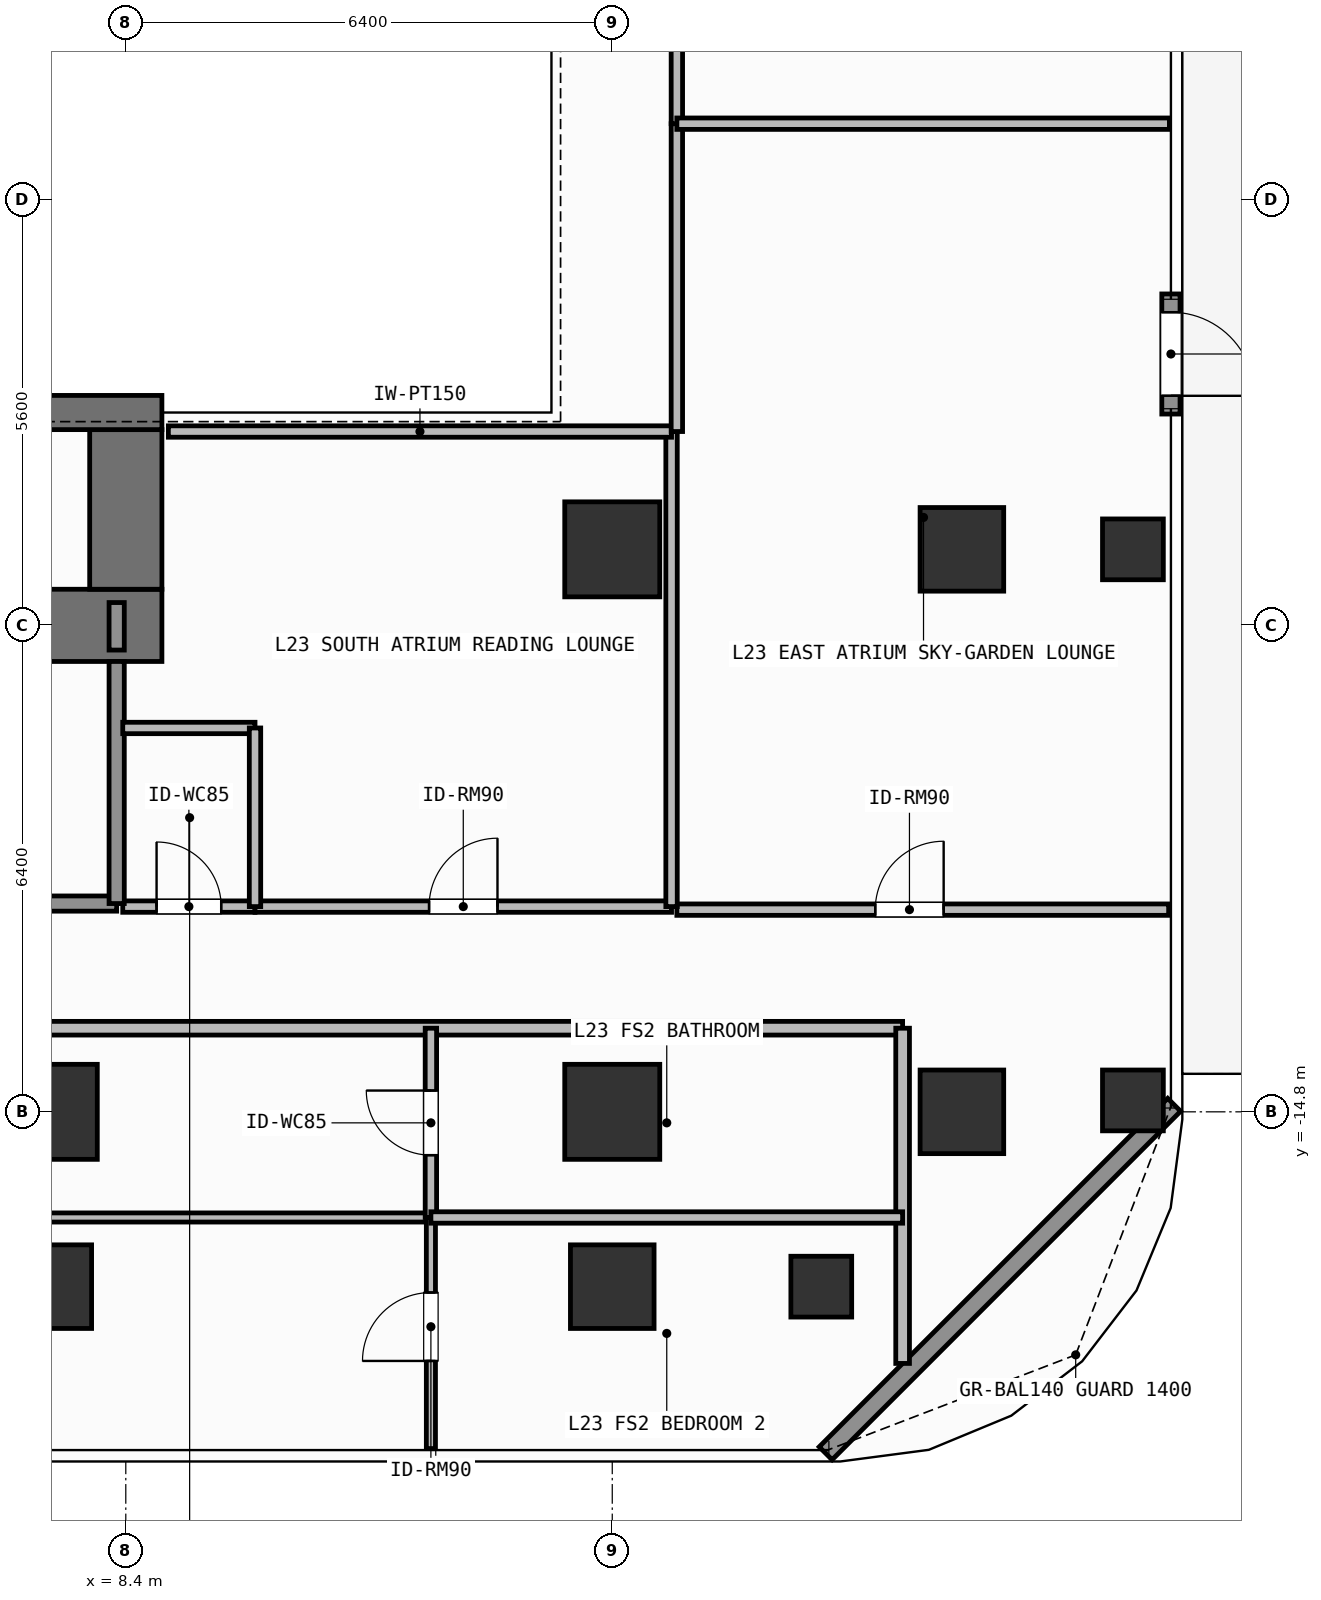
"""IFC4 building model, lengths in metres.
Left out: names, types, materials, properties, quantities, classifications, styles, units other than length and angle.
Written with IfcOpenShell. Run it as: python <this file> out.ifc"""

import sys

from ifc_helpers import new_model, si_unit, direction, frame, frame_2d, origin, origin_2d, place, context, subcontext, project, spatial, rectangle, hollow_rectangle, extrude, element, fill, save


model = new_model("IFC4")
c1 = context("Model", 3, precision=1e-05, world=origin(), true_north=direction((0.0, 1.0)))
c2 = subcontext(c1, "Body", "Model", "MODEL_VIEW")
j1 = project(units=[si_unit("LENGTHUNIT", "METRE"), si_unit("PLANEANGLEUNIT", "RADIAN")], contexts=[c1])
p1 = place(None, origin())
s1 = spatial("IfcSite", under=j1, at=p1, CompositionType="ELEMENT")
p2 = place(p1, origin())
s2 = spatial("IfcBuilding", under=s1, at=p2, CompositionType="ELEMENT")
p3 = place(p2, frame((0.0, 0.0, 93.0)))
s3 = spatial("IfcBuildingStorey", under=s2, at=p3, CompositionType="ELEMENT", Elevation=93.0)
p4 = place(p3, frame((6.12, -8.4, 0.0), z_axis=(0.0, 0.0, 1.0), x_axis=(1.0, 0.0, 0.0)))
e1 = element("IfcWall", 1, at=p4, inside=s3, PredefinedType="SHEAR", context=c2, shape_type="SweptSolid", body=[
    extrude(rectangle(XDim=2.755, YDim=0.95, at=frame_2d((1.377, 0.0))), origin(), (0.0, 0.0, 1.0), 3.9),
])
p5 = place(p3, frame((8.4, -7.925, 0.0), z_axis=(0.0, 0.0, 1.0), x_axis=(0.0, 1.0, 0.0)))
e2 = element("IfcWall", 2, at=p5, inside=s3, PredefinedType="SHEAR", context=c2, shape_type="SweptSolid", body=[
    extrude(rectangle(XDim=2.1, YDim=0.95, at=frame_2d((1.05, 0.0))), origin(), (0.0, 0.0, 1.0), 3.9),
])
p6 = place(p3, frame((3.045, -5.6, 0.0), z_axis=(0.0, 0.0, 1.0), x_axis=(1.0, 0.0, 0.0)))
e3 = element("IfcWall", 3, at=p6, inside=s3, PredefinedType="SHEAR", context=c2, shape_type="SweptSolid", body=[
    extrude(rectangle(XDim=5.83, YDim=0.45, at=frame_2d((2.915, 0.0))), origin(), (0.0, 0.0, 1.0), 3.9),
])
for number, where, z_axis, x_axis in (
    (4, (7.4, -14.8, 0.0), (0.0, 0.0, 1.0), (1.0, 0.0, 0.0)),
    (5, (14.8, -14.8, 0.0), (0.0, 0.0, 1.0), (1.0, 0.0, 0.0)),
    (6, (14.8, -7.4, 0.0), (0.0, 0.0, 1.0), (1.0, 0.0, 0.0)),
):
    element("IfcColumn", number, at=place(p3, frame(where, z_axis=z_axis, x_axis=x_axis)), inside=s3, PredefinedType="COLUMN", context=c2, shape_type="SweptSolid", body=[
        extrude(rectangle(XDim=1.25, YDim=1.25, at=origin_2d()), origin(), (0.0, 0.0, 1.0), 3.9),
    ])
for number, where, z_axis, x_axis in (
    (7, (19.4, -14.8, 0.0), (0.0, 0.0, 1.0), (1.0, 0.0, 0.0)),
    (8, (19.4, -7.4, 0.0), (0.0, 0.0, 1.0), (1.0, 0.0, 0.0)),
    (9, (7.4, -17.1, 0.0), (0.0, 0.0, 1.0), (1.0, 0.0, 0.0)),
    (10, (14.8, -17.1, 0.0), (0.0, 0.0, 1.0), (1.0, 0.0, 0.0)),
):
    element("IfcColumn", number, at=place(p3, frame(where, z_axis=z_axis, x_axis=x_axis)), inside=s3, PredefinedType="COLUMN", context=c2, shape_type="SweptSolid", body=[
        extrude(rectangle(XDim=1.1, YDim=1.1, at=origin_2d()), origin(), (0.0, 0.0, 1.0), 3.9),
    ])
for number, where, z_axis, x_axis in (
    (11, (17.55, -17.1, 0.0), (0.0, 0.0, 1.0), (1.0, 0.0, 0.0)),
    (12, (21.65, -14.65, 0.0), (0.0, 0.0, 1.0), (1.0, 0.0, 0.0)),
    (13, (21.65, -7.4, 0.0), (0.0, 0.0, 1.0), (1.0, 0.0, 0.0)),
):
    element("IfcColumn", number, at=place(p3, frame(where, z_axis=z_axis, x_axis=x_axis)), inside=s3, PredefinedType="COLUMN", context=c2, shape_type="SweptSolid", body=[
        extrude(hollow_rectangle(XDim=0.8, YDim=0.8, WallThickness=0.036, at=origin_2d()), origin(), (0.0, 0.0, 1.0), 3.9),
    ])
p7 = place(p3, frame((22.15, -4.04, 0.0), z_axis=(0.0, 0.0, 1.0), x_axis=(0.0, -1.0, 0.0)))
e14 = element("IfcWall", 14, at=p7, inside=s3, PredefinedType="SOLIDWALL", context=c2, shape_type="SweptSolid", body=[
    extrude(rectangle(XDim=1.58, YDim=0.24, at=frame_2d((0.79, 0.0))), origin(), (0.0, 0.0, 1.0), 3.68),
])
p8 = place(p7, frame((0.24, 0.0, 0.0)))
e15 = element("IfcOpeningElement", 15, at=p8, cuts=e14, PredefinedType="OPENING", context=c2, shape_type="SweptSolid", body=[
    extrude(rectangle(XDim=1.1, YDim=2.2, at=frame_2d((0.55, 1.1))), frame((0.0, 0.13, 0.0), z_axis=(0.0, -1.0, 0.0), x_axis=(1.0, 0.0, 0.0)), (0.0, 0.0, 1.0), 0.26),
])
p9 = place(p3, frame((22.192, -14.708, 0.0), z_axis=(0.0, 0.0, 1.0), x_axis=(-0.707087954376, -0.707125607496, 0.0)))
e16 = element("IfcWall", 16, at=p9, inside=s3, PredefinedType="SOLIDWALL", context=c2, shape_type="SweptSolid", body=[
    extrude(rectangle(XDim=6.484, YDim=0.24, at=frame_2d((3.242, 0.0))), origin(), (0.0, 0.0, 1.0), 3.68),
])
p10 = place(p3, frame((4.58, -12.06, 0.0), z_axis=(0.0, 0.0, 1.0), x_axis=(1.0, 0.0, 0.0)))
e17 = element("IfcWall", 17, at=p10, inside=s3, PredefinedType="SOLIDWALL", context=c2, shape_type="SweptSolid", body=[
    extrude(rectangle(XDim=3.7, YDim=0.2, at=frame_2d((1.85, 0.0))), origin(), (0.0, 0.0, 1.0), 3.68),
])
p11 = place(p10, frame((1.212, 0.0, 0.0)))
e18 = element("IfcOpeningElement", 18, at=p11, cuts=e17, PredefinedType="OPENING", context=c2, shape_type="SweptSolid", body=[
    extrude(rectangle(XDim=1.1, YDim=2.15, at=frame_2d((0.55, 1.075))), frame((0.0, 0.11, 0.0), z_axis=(0.0, -1.0, 0.0), x_axis=(1.0, 0.0, 0.0)), (0.0, 0.0, 1.0), 0.22),
])
p12 = place(p3, frame((8.36, -12.1, 0.0), z_axis=(0.0, 0.0, 1.0), x_axis=(1.0, 0.0, 0.0)))
e19 = element("IfcWall", 19, at=p12, inside=s3, PredefinedType="PARTITIONING", context=c2, shape_type="SweptSolid", body=[
    extrude(rectangle(XDim=1.74, YDim=0.15, at=frame_2d((0.87, 0.0))), origin(), (0.0, 0.0, 1.0), 3.68),
])
p13 = place(p12, frame((0.445, 0.0, 0.0)))
e20 = element("IfcOpeningElement", 20, at=p13, cuts=e19, PredefinedType="OPENING", context=c2, shape_type="SweptSolid", body=[
    extrude(rectangle(XDim=0.85, YDim=2.1, at=frame_2d((0.425, 1.05))), frame((0.0, 0.085, 0.0), z_axis=(0.0, -1.0, 0.0), x_axis=(1.0, 0.0, 0.0)), (0.0, 0.0, 1.0), 0.17),
])
p14 = place(p3, frame((10.1, -12.1, 0.0), z_axis=(0.0, 0.0, 1.0), x_axis=(1.0, 0.0, 0.0)))
e21 = element("IfcWall", 21, at=p14, inside=s3, PredefinedType="PARTITIONING", context=c2, shape_type="SweptSolid", body=[
    extrude(rectangle(XDim=5.48, YDim=0.15, at=frame_2d((2.74, 0.0))), origin(), (0.0, 0.0, 1.0), 3.68),
])
p15 = place(p14, frame((2.29, 0.0, 0.0)))
e22 = element("IfcOpeningElement", 22, at=p15, cuts=e21, PredefinedType="OPENING", context=c2, shape_type="SweptSolid", body=[
    extrude(rectangle(XDim=0.9, YDim=2.1, at=frame_2d((0.45, 1.05))), frame((0.0, 0.085, 0.0), z_axis=(0.0, -1.0, 0.0), x_axis=(1.0, 0.0, 0.0)), (0.0, 0.0, 1.0), 0.17),
])
p16 = place(p3, frame((-7.634, -13.7, 0.0), z_axis=(0.0, 0.0, 1.0), x_axis=(1.0, 0.0, 0.0)))
e23 = element("IfcWall", 23, at=p16, inside=s3, PredefinedType="PARTITIONING", context=c2, shape_type="SweptSolid", body=[
    extrude(rectangle(XDim=26.254, YDim=0.18, at=frame_2d((13.127, 0.0))), origin(), (0.0, 0.0, 1.0), 3.68),
])
p17 = place(p16, frame((12.178, 0.0, 0.0)))
e24 = element("IfcOpeningElement", 24, at=p17, cuts=e23, PredefinedType="OPENING", context=c2, shape_type="SweptSolid", body=[
    extrude(rectangle(XDim=1.0, YDim=2.2, at=frame_2d((0.5, 1.1))), frame((0.0, 0.1, 0.0), z_axis=(0.0, -1.0, 0.0), x_axis=(1.0, 0.0, 0.0)), (0.0, 0.0, 1.0), 0.2),
])
p18 = place(p3, frame((-2.24, -16.19, 0.0), z_axis=(0.0, 0.0, 1.0), x_axis=(1.0, 0.0, 0.0)))
e25 = element("IfcWall", 25, at=p18, inside=s3, PredefinedType="PARTITIONING", context=c2, shape_type="SweptSolid", body=[
    extrude(rectangle(XDim=14.654, YDim=0.12, at=frame_2d((7.327, 0.0))), origin(), (0.0, 0.0, 1.0), 3.68),
])
p19 = place(p18, frame((6.787, 0.0, 0.0)))
e26 = element("IfcOpeningElement", 26, at=p19, cuts=e25, PredefinedType="OPENING", context=c2, shape_type="SweptSolid", body=[
    extrude(rectangle(XDim=0.9, YDim=2.1, at=frame_2d((0.45, 1.05))), frame((0.0, 0.07, 0.0), z_axis=(0.0, -1.0, 0.0), x_axis=(1.0, 0.0, 0.0)), (0.0, 0.0, 1.0), 0.14),
])
p20 = place(p3, frame((12.414, -16.19, 0.0), z_axis=(0.0, 0.0, 1.0), x_axis=(0.0, 1.0, 0.0)))
e27 = element("IfcWall", 27, at=p20, inside=s3, PredefinedType="PARTITIONING", context=c2, shape_type="SweptSolid", body=[
    extrude(rectangle(XDim=2.49, YDim=0.15, at=frame_2d((1.245, 0.0))), origin(), (0.0, 0.0, 1.0), 3.68),
])
p21 = place(p20, frame((0.82, 0.0, 0.0)))
e28 = element("IfcOpeningElement", 28, at=p21, cuts=e27, PredefinedType="OPENING", context=c2, shape_type="SweptSolid", body=[
    extrude(rectangle(XDim=0.85, YDim=2.1, at=frame_2d((0.425, 1.05))), frame((0.0, 0.085, 0.0), z_axis=(0.0, -1.0, 0.0), x_axis=(1.0, 0.0, 0.0)), (0.0, 0.0, 1.0), 0.17),
])
p22 = place(p3, frame((12.414, -19.23, 0.0), z_axis=(0.0, 0.0, 1.0), x_axis=(0.0, 1.0, 0.0)))
e29 = element("IfcWall", 29, at=p22, inside=s3, PredefinedType="PARTITIONING", context=c2, shape_type="SweptSolid", body=[
    extrude(rectangle(XDim=3.04, YDim=0.12, at=frame_2d((1.52, 0.0))), origin(), (0.0, 0.0, 1.0), 3.68),
])
p23 = place(p22, frame((1.153, 0.0, 0.0)))
e30 = element("IfcOpeningElement", 30, at=p23, cuts=e29, PredefinedType="OPENING", context=c2, shape_type="SweptSolid", body=[
    extrude(rectangle(XDim=0.9, YDim=2.1, at=frame_2d((0.45, 1.05))), frame((0.0, 0.07, 0.0), z_axis=(0.0, -1.0, 0.0), x_axis=(1.0, 0.0, 0.0)), (0.0, 0.0, 1.0), 0.14),
])
p24 = place(p3, frame((15.65, -12.14, 0.0), z_axis=(0.0, 0.0, 1.0), x_axis=(1.0, 0.0, 0.0)))
e31 = element("IfcWall", 31, at=p24, inside=s3, PredefinedType="PARTITIONING", context=c2, shape_type="SweptSolid", body=[
    extrude(rectangle(XDim=6.47, YDim=0.15, at=frame_2d((3.235, 0.0))), origin(), (0.0, 0.0, 1.0), 3.68),
])
p25 = place(p24, frame((2.61, 0.0, 0.0)))
e32 = element("IfcOpeningElement", 32, at=p25, cuts=e31, PredefinedType="OPENING", context=c2, shape_type="SweptSolid", body=[
    extrude(rectangle(XDim=0.9, YDim=2.1, at=frame_2d((0.45, 1.05))), frame((0.0, 0.085, 0.0), z_axis=(0.0, -1.0, 0.0), x_axis=(1.0, 0.0, 0.0)), (0.0, 0.0, 1.0), 0.17),
])
p26 = place(p3, frame((8.28, -12.06, 0.0), z_axis=(0.0, 0.0, 1.0), x_axis=(0.0, 1.0, 0.0)))
e33 = element("IfcWall", 33, at=p26, inside=s3, PredefinedType="SOLIDWALL", context=c2, shape_type="SweptSolid", body=[
    extrude(rectangle(XDim=3.185, YDim=0.2, at=frame_2d((1.593, 0.0))), origin(), (0.0, 0.0, 1.0), 3.68),
])
p27 = place(p3, frame((8.28, -8.725, 0.0), z_axis=(0.0, 0.0, 1.0), x_axis=(0.0, 1.0, 0.0)))
e34 = element("IfcWall", 34, at=p27, inside=s3, PredefinedType="SOLIDWALL", context=c2, shape_type="SweptSolid", body=[
    extrude(rectangle(XDim=0.625, YDim=0.2, at=frame_2d((0.312, 0.0))), origin(), (0.0, 0.0, 1.0), 3.68),
])
p28 = place(p3, frame((8.36, -9.75, 0.0), z_axis=(0.0, 0.0, 1.0), x_axis=(1.0, 0.0, 0.0)))
e35 = element("IfcWall", 35, at=p28, inside=s3, PredefinedType="PARTITIONING", context=c2, shape_type="SweptSolid", body=[
    extrude(rectangle(XDim=1.74, YDim=0.15, at=frame_2d((0.87, 0.0))), origin(), (0.0, 0.0, 1.0), 3.68),
])
p29 = place(p3, frame((10.1, -12.1, 0.0), z_axis=(0.0, 0.0, 1.0), x_axis=(0.0, 1.0, 0.0)))
e36 = element("IfcWall", 36, at=p29, inside=s3, PredefinedType="PARTITIONING", context=c2, shape_type="SweptSolid", body=[
    extrude(rectangle(XDim=2.35, YDim=0.15, at=frame_2d((1.175, 0.0))), origin(), (0.0, 0.0, 1.0), 3.68),
])
p30 = place(p3, frame((15.58, -12.1, 0.0), z_axis=(0.0, 0.0, 1.0), x_axis=(0.0, 1.0, 0.0)))
e37 = element("IfcWall", 37, at=p30, inside=s3, PredefinedType="PARTITIONING", context=c2, shape_type="SweptSolid", body=[
    extrude(rectangle(XDim=6.25, YDim=0.15, at=frame_2d((3.125, 0.0))), origin(), (0.0, 0.0, 1.0), 3.68),
])
p31 = place(p3, frame((8.96, -5.85, 0.0), z_axis=(0.0, 0.0, 1.0), x_axis=(1.0, 0.0, 0.0)))
e38 = element("IfcWall", 38, at=p31, inside=s3, PredefinedType="PARTITIONING", context=c2, shape_type="SweptSolid", body=[
    extrude(rectangle(XDim=6.62, YDim=0.15, at=frame_2d((3.31, 0.0))), origin(), (0.0, 0.0, 1.0), 3.68),
])
p32 = place(p3, frame((18.62, -18.11, 0.0), z_axis=(0.0, 0.0, 1.0), x_axis=(0.0, 1.0, 0.0)))
e39 = element("IfcWall", 39, at=p32, inside=s3, PredefinedType="PARTITIONING", context=c2, shape_type="SweptSolid", body=[
    extrude(rectangle(XDim=4.41, YDim=0.18, at=frame_2d((2.205, 0.0))), origin(), (0.0, 0.0, 1.0), 3.68),
])
p33 = place(p3, frame((12.414, -16.19, 0.0), z_axis=(0.0, 0.0, 1.0), x_axis=(1.0, 0.0, 0.0)))
e40 = element("IfcWall", 40, at=p33, inside=s3, PredefinedType="PARTITIONING", context=c2, shape_type="SweptSolid", body=[
    extrude(rectangle(XDim=6.206, YDim=0.15, at=frame_2d((3.103, 0.0))), origin(), (0.0, 0.0, 1.0), 3.68),
])
p34 = place(p3, frame((15.65, -5.85, 0.0), z_axis=(0.0, 0.0, 1.0), x_axis=(0.0, 1.0, 0.0)))
e41 = element("IfcWall", 41, at=p34, inside=s3, PredefinedType="PARTITIONING", context=c2, shape_type="SweptSolid", body=[
    extrude(rectangle(XDim=4.05, YDim=0.15, at=frame_2d((2.025, 0.0))), origin(), (0.0, 0.0, 1.0), 3.68),
])
p35 = place(p3, frame((15.65, -1.8, 0.0), z_axis=(0.0, 0.0, 1.0), x_axis=(0.0, 1.0, 0.0)))
e42 = element("IfcWall", 42, at=p35, inside=s3, PredefinedType="PARTITIONING", context=c2, shape_type="SweptSolid", body=[
    extrude(rectangle(XDim=7.65, YDim=0.15, at=frame_2d((3.825, 0.0))), origin(), (0.0, 0.0, 1.0), 3.68),
])
p36 = place(p3, frame((15.65, -1.8, 0.0), z_axis=(0.0, 0.0, 1.0), x_axis=(1.0, 0.0, 0.0)))
e43 = element("IfcWall", 43, at=p36, inside=s3, PredefinedType="PARTITIONING", context=c2, shape_type="SweptSolid", body=[
    extrude(rectangle(XDim=6.48, YDim=0.15, at=frame_2d((3.24, 0.0))), origin(), (0.0, 0.0, 1.0), 3.68),
])
p37 = place(p8, origin())
e44 = element("IfcDoor", 44, at=p37, inside=s3, OperationType="SINGLE_SWING_RIGHT", PredefinedType="DOOR", context=c2, shape_type="SweptSolid", body=[
    extrude(rectangle(XDim=1.1, YDim=2.2, at=frame_2d((0.55, 1.1))), frame((0.0, 0.025, 0.0), z_axis=(0.0, -1.0, 0.0), x_axis=(1.0, 0.0, 0.0)), (0.0, 0.0, 1.0), 0.05),
])
fill(e15, e44)
p38 = place(p13, origin())
e45 = element("IfcDoor", 45, at=p38, inside=s3, OperationType="SINGLE_SWING_LEFT", PredefinedType="DOOR", context=c2, shape_type="SweptSolid", body=[
    extrude(rectangle(XDim=0.85, YDim=2.1, at=frame_2d((0.425, 1.05))), frame((0.0, 0.025, 0.0), z_axis=(0.0, -1.0, 0.0), x_axis=(1.0, 0.0, 0.0)), (0.0, 0.0, 1.0), 0.05),
])
fill(e20, e45)
p39 = place(p15, origin())
e46 = element("IfcDoor", 46, at=p39, inside=s3, OperationType="SINGLE_SWING_RIGHT", PredefinedType="DOOR", context=c2, shape_type="SweptSolid", body=[
    extrude(rectangle(XDim=0.9, YDim=2.1, at=frame_2d((0.45, 1.05))), frame((0.0, 0.025, 0.0), z_axis=(0.0, -1.0, 0.0), x_axis=(1.0, 0.0, 0.0)), (0.0, 0.0, 1.0), 0.05),
])
fill(e22, e46)
p40 = place(p21, origin())
e47 = element("IfcDoor", 47, at=p40, inside=s3, OperationType="SINGLE_SWING_RIGHT", PredefinedType="DOOR", context=c2, shape_type="SweptSolid", body=[
    extrude(rectangle(XDim=0.85, YDim=2.1, at=frame_2d((0.425, 1.05))), frame((0.0, 0.025, 0.0), z_axis=(0.0, -1.0, 0.0), x_axis=(1.0, 0.0, 0.0)), (0.0, 0.0, 1.0), 0.05),
])
fill(e28, e47)
p41 = place(p23, origin())
e48 = element("IfcDoor", 48, at=p41, inside=s3, OperationType="SINGLE_SWING_LEFT", PredefinedType="DOOR", context=c2, shape_type="SweptSolid", body=[
    extrude(rectangle(XDim=0.9, YDim=2.1, at=frame_2d((0.45, 1.05))), frame((0.0, 0.025, 0.0), z_axis=(0.0, -1.0, 0.0), x_axis=(1.0, 0.0, 0.0)), (0.0, 0.0, 1.0), 0.05),
])
fill(e30, e48)
p42 = place(p25, origin())
e49 = element("IfcDoor", 49, at=p42, inside=s3, OperationType="SINGLE_SWING_RIGHT", PredefinedType="DOOR", context=c2, shape_type="SweptSolid", body=[
    extrude(rectangle(XDim=0.9, YDim=2.1, at=frame_2d((0.45, 1.05))), frame((0.0, 0.025, 0.0), z_axis=(0.0, -1.0, 0.0), x_axis=(1.0, 0.0, 0.0)), (0.0, 0.0, 1.0), 0.05),
])
fill(e32, e49)
save(model, sys.argv[1])
